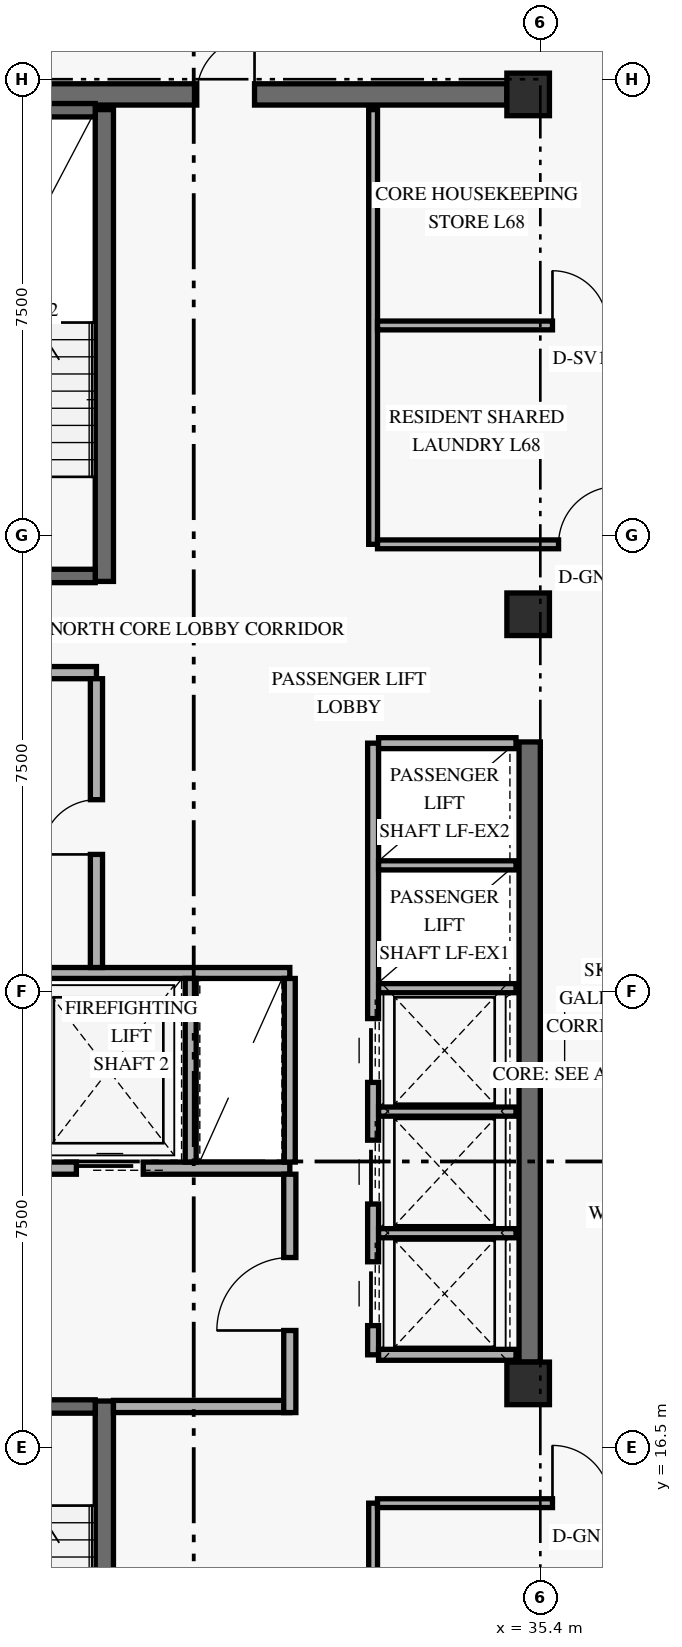
"""IFC4 building model, lengths in metres.
Left out: names, types, materials, properties, quantities, classifications, styles, units other than length and angle.
Written with IfcOpenShell. Run it as: python <this file> out.ifc"""

import sys

from ifc_helpers import new_model, si_unit, direction, frame, frame_2d, origin, origin_2d, place, context, subcontext, project, spatial, rectangle, extrude, element, fill, save


model = new_model("IFC4")
c1 = context("Model", 3, precision=1e-05, world=origin(), true_north=direction((0.0, 1.0)))
c2 = subcontext(c1, "Body", "Model", "MODEL_VIEW")
j1 = project(units=[si_unit("LENGTHUNIT", "METRE"), si_unit("PLANEANGLEUNIT", "RADIAN")], contexts=[c1])
p1 = place(None, origin())
s1 = spatial("IfcSite", under=j1, at=p1, CompositionType="ELEMENT")
p2 = place(p1, origin())
s2 = spatial("IfcBuilding", under=s1, at=p2, CompositionType="ELEMENT")
p3 = place(p2, frame((0.0, 0.0, 260.4)))
s3 = spatial("IfcBuildingStorey", under=s2, at=p3, CompositionType="ELEMENT", Elevation=260.4)
p4 = place(p3, frame((35.225, 17.9, 0.0), z_axis=(0.0, 0.0, 1.0), x_axis=(0.0, 1.0, 0.0)))
e1 = element("IfcWall", 1, at=p4, inside=s3, PredefinedType="SHEAR", context=c2, shape_type="SweptSolid", body=[
    extrude(rectangle(XDim=10.2, YDim=0.35, at=frame_2d((5.1, 0.0))), origin(), (0.0, 0.0, 1.0), 2.821),
])
p5 = place(p3, frame((24.55, 38.75, 0.0), z_axis=(0.0, 0.0, 1.0), x_axis=(1.0, 0.0, 0.0)))
e2 = element("IfcWall", 2, at=p5, inside=s3, PredefinedType="SHEAR", context=c2, shape_type="SweptSolid", body=[
    extrude(rectangle(XDim=10.3, YDim=0.35, at=frame_2d((5.15, 0.0))), origin(), (0.0, 0.0, 1.0), 3.36),
])
p6 = place(p5, frame((5.2, 0.0, 0.0)))
e3 = element("IfcOpeningElement", 3, at=p6, cuts=e2, PredefinedType="OPENING", context=c2, shape_type="SweptSolid", body=[
    extrude(rectangle(XDim=0.95, YDim=2.15, at=frame_2d((0.475, 1.075))), frame((0.0, 0.185, 0.0), z_axis=(0.0, -1.0, 0.0), x_axis=(1.0, 0.0, 0.0)), (0.0, 0.0, 1.0), 0.37),
])
p7 = place(p3, frame((28.23, 9.5, 0.0), z_axis=(0.0, 0.0, 1.0), x_axis=(0.0, 1.0, 0.0)))
e4 = element("IfcWall", 4, at=p7, inside=s3, PredefinedType="SHEAR", context=c2, shape_type="SweptSolid", body=[
    extrude(rectangle(XDim=7.76, YDim=0.3, at=frame_2d((3.88, 0.0))), origin(), (0.0, 0.0, 1.0), 3.36),
])
p8 = place(p3, frame((24.92, 17.17, 0.0), z_axis=(0.0, 0.0, 1.0), x_axis=(1.0, 0.0, 0.0)))
e5 = element("IfcWall", 5, at=p8, inside=s3, PredefinedType="SHEAR", context=c2, shape_type="SweptSolid", body=[
    extrude(rectangle(XDim=3.16, YDim=0.22, at=frame_2d((1.58, 0.0))), origin(), (0.0, 0.0, 1.0), 3.36),
])
p9 = place(p8, frame((0.78, 0.0, 0.0)))
e6 = element("IfcOpeningElement", 6, at=p9, cuts=e5, PredefinedType="OPENING", context=c2, shape_type="SweptSolid", body=[
    extrude(rectangle(XDim=1.05, YDim=2.15, at=frame_2d((0.525, 1.075))), frame((0.0, 0.12, 0.0), z_axis=(0.0, -1.0, 0.0), x_axis=(1.0, 0.0, 0.0)), (0.0, 0.0, 1.0), 0.24),
])
p10 = place(p3, frame((28.23, 30.74, 0.0), z_axis=(0.0, 0.0, 1.0), x_axis=(0.0, 1.0, 0.0)))
e7 = element("IfcWall", 7, at=p10, inside=s3, PredefinedType="SHEAR", context=c2, shape_type="SweptSolid", body=[
    extrude(rectangle(XDim=7.76, YDim=0.3, at=frame_2d((3.88, 0.0))), origin(), (0.0, 0.0, 1.0), 3.36),
])
p11 = place(p3, frame((24.92, 30.83, 0.0), z_axis=(0.0, 0.0, 1.0), x_axis=(1.0, 0.0, 0.0)))
e8 = element("IfcWall", 8, at=p11, inside=s3, PredefinedType="SHEAR", context=c2, shape_type="SweptSolid", body=[
    extrude(rectangle(XDim=3.16, YDim=0.22, at=frame_2d((1.58, 0.0))), origin(), (0.0, 0.0, 1.0), 3.36),
])
p12 = place(p11, frame((0.78, 0.0, 0.0)))
e9 = element("IfcOpeningElement", 9, at=p12, cuts=e8, PredefinedType="OPENING", context=c2, shape_type="SweptSolid", body=[
    extrude(rectangle(XDim=1.05, YDim=2.15, at=frame_2d((0.525, 1.075))), frame((0.0, 0.12, 0.0), z_axis=(0.0, -1.0, 0.0), x_axis=(1.0, 0.0, 0.0)), (0.0, 0.0, 1.0), 0.24),
])
p13 = place(p3, frame((24.92, 38.49, 0.0), z_axis=(0.0, 0.0, 1.0), x_axis=(1.0, 0.0, 0.0)))
e10 = element("IfcWall", 10, at=p13, inside=s3, PredefinedType="SHEAR", context=c2, shape_type="SweptSolid", body=[
    extrude(rectangle(XDim=3.16, YDim=0.22, at=frame_2d((1.58, 0.0))), origin(), (0.0, 0.0, 1.0), 3.36),
])
for number, where, z_axis, x_axis in (
    (11, (35.2, 17.55, 0.0), (0.0, 0.0, 1.0), (1.0, 0.0, 0.0)),
    (12, (35.2, 30.2, 0.0), (0.0, 0.0, 1.0), (1.0, 0.0, 0.0)),
    (13, (35.2, 38.75, 0.0), (0.0, 0.0, 1.0), (1.0, 0.0, 0.0)),
):
    element("IfcColumn", number, at=place(p3, frame(where, z_axis=z_axis, x_axis=x_axis)), inside=s3, PredefinedType="COLUMN", context=c2, shape_type="SweptSolid", body=[
        extrude(rectangle(XDim=0.7, YDim=0.7, at=origin_2d()), origin(), (0.0, 0.0, 1.0), 3.6),
    ])
p14 = place(p3, frame((24.45, 21.09, 0.0), z_axis=(0.0, 0.0, 1.0), x_axis=(1.0, 0.0, 0.0)))
e14 = element("IfcWall", 14, at=p14, inside=s3, PredefinedType="STANDARD", context=c2, shape_type="SweptSolid", body=[
    extrude(rectangle(XDim=6.83, YDim=0.2, at=frame_2d((3.415, 0.0))), origin(), (0.0, 0.0, 1.0), 3.36),
])
p15 = place(p14, frame((0.72, 0.0, 0.0)))
e15 = element("IfcOpeningElement", 15, at=p15, cuts=e14, PredefinedType="OPENING", context=c2, shape_type="SweptSolid", body=[
    extrude(rectangle(XDim=1.1, YDim=2.2, at=frame_2d((0.55, 1.1))), frame((0.0, 0.11, 0.0), z_axis=(0.0, -1.0, 0.0), x_axis=(1.0, 0.0, 0.0)), (0.0, 0.0, 1.0), 0.22),
])
p16 = place(p14, frame((3.32, 0.0, 0.0)))
e16 = element("IfcOpeningElement", 16, at=p16, cuts=e14, PredefinedType="OPENING", context=c2, shape_type="SweptSolid", body=[
    extrude(rectangle(XDim=1.1, YDim=2.2, at=frame_2d((0.55, 1.1))), frame((0.0, 0.11, 0.0), z_axis=(0.0, -1.0, 0.0), x_axis=(1.0, 0.0, 0.0)), (0.0, 0.0, 1.0), 0.22),
])
p17 = place(p3, frame((28.38, 17.17, 0.0), z_axis=(0.0, 0.0, 1.0), x_axis=(1.0, 0.0, 0.0)))
e17 = element("IfcWall", 17, at=p17, inside=s3, PredefinedType="STANDARD", context=c2, shape_type="SweptSolid", body=[
    extrude(rectangle(XDim=2.9, YDim=0.2, at=frame_2d((1.45, 0.0))), origin(), (0.0, 0.0, 1.0), 3.36),
])
p18 = place(p3, frame((31.28, 17.07, 0.0), z_axis=(0.0, 0.0, 1.0), x_axis=(0.0, 1.0, 0.0)))
e18 = element("IfcWall", 18, at=p18, inside=s3, PredefinedType="STANDARD", context=c2, shape_type="SweptSolid", body=[
    extrude(rectangle(XDim=3.92, YDim=0.2, at=frame_2d((1.96, 0.0))), origin(), (0.0, 0.0, 1.0), 2.803),
])
p19 = place(p18, frame((1.35, 0.0, 0.0)))
e19 = element("IfcOpeningElement", 19, at=p19, cuts=e18, PredefinedType="OPENING", context=c2, shape_type="SweptSolid", body=[
    extrude(rectangle(XDim=1.2, YDim=2.15, at=frame_2d((0.6, 1.075))), frame((0.0, 0.11, 0.0), z_axis=(0.0, -1.0, 0.0), x_axis=(1.0, 0.0, 0.0)), (0.0, 0.0, 1.0), 0.22),
])
p20 = place(p3, frame((24.45, 24.3, 0.0), z_axis=(0.0, 0.0, 1.0), x_axis=(1.0, 0.0, 0.0)))
e20 = element("IfcWall", 20, at=p20, inside=s3, PredefinedType="STANDARD", context=c2, shape_type="SweptSolid", body=[
    extrude(rectangle(XDim=6.83, YDim=0.18, at=frame_2d((3.415, 0.0))), origin(), (0.0, 0.0, 1.0), 3.36),
])
for number, where, z_axis, x_axis in (
    (21, (29.65, 21.19, 0.0), (0.0, 0.0, 1.0), (0.0, 1.0, 0.0)),
    (22, (31.28, 21.19, 0.0), (0.0, 0.0, 1.0), (0.0, 1.0, 0.0)),
):
    element("IfcWall", number, at=place(p3, frame(where, z_axis=z_axis, x_axis=x_axis)), inside=s3, PredefinedType="STANDARD", context=c2, shape_type="SweptSolid", body=[
        extrude(rectangle(XDim=3.02, YDim=0.18, at=frame_2d((1.51, 0.0))), origin(), (0.0, 0.0, 1.0), 3.36),
    ])
p21 = place(p3, frame((24.45, 29.24, 0.0), z_axis=(0.0, 0.0, 1.0), x_axis=(1.0, 0.0, 0.0)))
e23 = element("IfcWall", 23, at=p21, inside=s3, PredefinedType="STANDARD", context=c2, shape_type="SweptSolid", body=[
    extrude(rectangle(XDim=3.65, YDim=0.2, at=frame_2d((1.825, 0.0))), origin(), (0.0, 0.0, 1.0), 3.36),
])
p22 = place(p3, frame((28.1, 24.39, 0.0), z_axis=(0.0, 0.0, 1.0), x_axis=(0.0, 1.0, 0.0)))
e24 = element("IfcWall", 24, at=p22, inside=s3, PredefinedType="STANDARD", context=c2, shape_type="SweptSolid", body=[
    extrude(rectangle(XDim=4.75, YDim=0.2, at=frame_2d((2.375, 0.0))), origin(), (0.0, 0.0, 1.0), 3.36),
])
p23 = place(p22, frame((1.86, 0.0, 0.0)))
e25 = element("IfcOpeningElement", 25, at=p23, cuts=e24, PredefinedType="OPENING", context=c2, shape_type="SweptSolid", body=[
    extrude(rectangle(XDim=0.9, YDim=2.1, at=frame_2d((0.45, 1.05))), frame((0.0, 0.11, 0.0), z_axis=(0.0, -1.0, 0.0), x_axis=(1.0, 0.0, 0.0)), (0.0, 0.0, 1.0), 0.22),
])
p24 = place(p3, frame((32.65, 18.02, 0.0), z_axis=(0.0, 0.0, 1.0), x_axis=(0.0, 1.0, 0.0)))
e26 = element("IfcWall", 26, at=p24, inside=s3, PredefinedType="STANDARD", context=c2, shape_type="SweptSolid", body=[
    extrude(rectangle(XDim=10.06, YDim=0.18, at=frame_2d((5.03, 0.0))), origin(), (0.0, 0.0, 1.0), 3.36),
])
p25 = place(p24, frame((0.48, 0.0, 0.0)))
e27 = element("IfcOpeningElement", 27, at=p25, cuts=e26, PredefinedType="OPENING", context=c2, shape_type="SweptSolid", body=[
    extrude(rectangle(XDim=1.05, YDim=2.2, at=frame_2d((0.525, 1.1))), frame((0.0, 0.1, 0.0), z_axis=(0.0, -1.0, 0.0), x_axis=(1.0, 0.0, 0.0)), (0.0, 0.0, 1.0), 0.2),
])
p26 = place(p24, frame((2.48, 0.0, 0.0)))
e28 = element("IfcOpeningElement", 28, at=p26, cuts=e26, PredefinedType="OPENING", context=c2, shape_type="SweptSolid", body=[
    extrude(rectangle(XDim=1.05, YDim=2.2, at=frame_2d((0.525, 1.1))), frame((0.0, 0.1, 0.0), z_axis=(0.0, -1.0, 0.0), x_axis=(1.0, 0.0, 0.0)), (0.0, 0.0, 1.0), 0.2),
])
p27 = place(p24, frame((4.48, 0.0, 0.0)))
e29 = element("IfcOpeningElement", 29, at=p27, cuts=e26, PredefinedType="OPENING", context=c2, shape_type="SweptSolid", body=[
    extrude(rectangle(XDim=1.05, YDim=2.2, at=frame_2d((0.525, 1.1))), frame((0.0, 0.1, 0.0), z_axis=(0.0, -1.0, 0.0), x_axis=(1.0, 0.0, 0.0)), (0.0, 0.0, 1.0), 0.2),
])
for number, where, z_axis, x_axis in (
    (30, (32.74, 18.02, 0.0), (0.0, 0.0, 1.0), (1.0, 0.0, 0.0)),
    (31, (32.74, 28.08, 0.0), (0.0, 0.0, 1.0), (1.0, 0.0, 0.0)),
):
    element("IfcWall", number, at=place(p3, frame(where, z_axis=z_axis, x_axis=x_axis)), inside=s3, PredefinedType="STANDARD", context=c2, shape_type="SweptSolid", body=[
        extrude(rectangle(XDim=2.26, YDim=0.18, at=frame_2d((1.13, 0.0))), origin(), (0.0, 0.0, 1.0), 3.36),
    ])
for number, where, z_axis, x_axis in (
    (32, (32.74, 20.02, 0.0), (0.0, 0.0, 1.0), (1.0, 0.0, 0.0)),
    (33, (32.74, 22.02, 0.0), (0.0, 0.0, 1.0), (1.0, 0.0, 0.0)),
    (34, (32.74, 24.05, 0.0), (0.0, 0.0, 1.0), (1.0, 0.0, 0.0)),
    (35, (32.74, 26.07, 0.0), (0.0, 0.0, 1.0), (1.0, 0.0, 0.0)),
):
    element("IfcWall", number, at=place(p3, frame(where, z_axis=z_axis, x_axis=x_axis)), inside=s3, PredefinedType="STANDARD", context=c2, shape_type="SweptSolid", body=[
        extrude(rectangle(XDim=2.26, YDim=0.15, at=frame_2d((1.13, 0.0))), origin(), (0.0, 0.0, 1.0), 3.36),
    ])
p28 = place(p3, frame((32.65, 9.5, 0.0), z_axis=(0.0, 0.0, 1.0), x_axis=(0.0, 1.0, 0.0)))
e36 = element("IfcWall", 36, at=p28, inside=s3, PredefinedType="PARTITIONING", context=c2, shape_type="SweptSolid", body=[
    extrude(rectangle(XDim=6.08, YDim=0.145, at=frame_2d((3.04, 0.0))), origin(), (0.0, 0.0, 1.0), 3.36),
])
p29 = place(p3, frame((32.722, 15.58, 0.0), z_axis=(0.0, 0.0, 1.0), x_axis=(1.0, 0.0, 0.0)))
e37 = element("IfcWall", 37, at=p29, inside=s3, PredefinedType="PARTITIONING", context=c2, shape_type="SweptSolid", body=[
    extrude(rectangle(XDim=4.828, YDim=0.145, at=frame_2d((2.414, 0.0))), origin(), (0.0, 0.0, 1.0), 2.803),
])
p30 = place(p29, frame((2.877, 0.0, 0.0)))
e38 = element("IfcOpeningElement", 38, at=p30, cuts=e37, PredefinedType="OPENING", context=c2, shape_type="SweptSolid", body=[
    extrude(rectangle(XDim=0.95, YDim=2.15, at=frame_2d((0.475, 1.075))), frame((0.0, 0.083, 0.0), z_axis=(0.0, -1.0, 0.0), x_axis=(1.0, 0.0, 0.0)), (0.0, 0.0, 1.0), 0.165),
])
p31 = place(p3, frame((32.65, 31.35, 0.0), z_axis=(0.0, 0.0, 1.0), x_axis=(0.0, 1.0, 0.0)))
e39 = element("IfcWall", 39, at=p31, inside=s3, PredefinedType="PARTITIONING", context=c2, shape_type="SweptSolid", body=[
    extrude(rectangle(XDim=7.15, YDim=0.145, at=frame_2d((3.575, 0.0))), origin(), (0.0, 0.0, 1.0), 3.36),
])
p32 = place(p3, frame((32.722, 31.35, 0.0), z_axis=(0.0, 0.0, 1.0), x_axis=(1.0, 0.0, 0.0)))
e40 = element("IfcWall", 40, at=p32, inside=s3, PredefinedType="PARTITIONING", context=c2, shape_type="SweptSolid", body=[
    extrude(rectangle(XDim=5.378, YDim=0.145, at=frame_2d((2.689, 0.0))), origin(), (0.0, 0.0, 1.0), 2.803),
])
p33 = place(p32, frame((2.978, 0.0, 0.0)))
e41 = element("IfcOpeningElement", 41, at=p33, cuts=e40, PredefinedType="OPENING", context=c2, shape_type="SweptSolid", body=[
    extrude(rectangle(XDim=0.95, YDim=2.15, at=frame_2d((0.475, 1.075))), frame((0.0, 0.083, 0.0), z_axis=(0.0, -1.0, 0.0), x_axis=(1.0, 0.0, 0.0)), (0.0, 0.0, 1.0), 0.165),
])
p34 = place(p3, frame((32.722, 34.95, 0.0), z_axis=(0.0, 0.0, 1.0), x_axis=(1.0, 0.0, 0.0)))
e42 = element("IfcWall", 42, at=p34, inside=s3, PredefinedType="PARTITIONING", context=c2, shape_type="SweptSolid", body=[
    extrude(rectangle(XDim=5.305, YDim=0.145, at=frame_2d((2.653, 0.0))), origin(), (0.0, 0.0, 1.0), 2.803),
])
p35 = place(p34, frame((2.877, 0.0, 0.0)))
e43 = element("IfcOpeningElement", 43, at=p35, cuts=e42, PredefinedType="OPENING", context=c2, shape_type="SweptSolid", body=[
    extrude(rectangle(XDim=0.9, YDim=2.1, at=frame_2d((0.45, 1.05))), frame((0.0, 0.083, 0.0), z_axis=(0.0, -1.0, 0.0), x_axis=(1.0, 0.0, 0.0)), (0.0, 0.0, 1.0), 0.165),
])
p36 = place(p16, origin())
e44 = element("IfcDoor", 44, at=p36, inside=s3, OperationType="SLIDING_TO_LEFT", PredefinedType="DOOR", context=c2, shape_type="SweptSolid", body=[
    extrude(rectangle(XDim=1.1, YDim=2.2, at=frame_2d((0.55, 1.1))), frame((0.0, 0.025, 0.0), z_axis=(0.0, -1.0, 0.0), x_axis=(1.0, 0.0, 0.0)), (0.0, 0.0, 1.0), 0.05),
])
fill(e16, e44)
p37 = place(p19, origin())
e45 = element("IfcDoor", 45, at=p37, inside=s3, OperationType="SINGLE_SWING_LEFT", PredefinedType="DOOR", context=c2, shape_type="SweptSolid", body=[
    extrude(rectangle(XDim=1.2, YDim=2.15, at=frame_2d((0.6, 1.075))), frame((0.0, 0.025, 0.0), z_axis=(0.0, -1.0, 0.0), x_axis=(1.0, 0.0, 0.0)), (0.0, 0.0, 1.0), 0.05),
])
fill(e19, e45)
p38 = place(p23, origin())
e46 = element("IfcDoor", 46, at=p38, inside=s3, OperationType="SINGLE_SWING_LEFT", PredefinedType="DOOR", context=c2, shape_type="SweptSolid", body=[
    extrude(rectangle(XDim=0.9, YDim=2.1, at=frame_2d((0.45, 1.05))), frame((0.0, 0.025, 0.0), z_axis=(0.0, -1.0, 0.0), x_axis=(1.0, 0.0, 0.0)), (0.0, 0.0, 1.0), 0.05),
])
fill(e25, e46)
p39 = place(p25, origin())
e47 = element("IfcDoor", 47, at=p39, inside=s3, OperationType="SLIDING_TO_LEFT", PredefinedType="DOOR", context=c2, shape_type="SweptSolid", body=[
    extrude(rectangle(XDim=1.05, YDim=2.2, at=frame_2d((0.525, 1.1))), frame((0.0, 0.025, 0.0), z_axis=(0.0, -1.0, 0.0), x_axis=(1.0, 0.0, 0.0)), (0.0, 0.0, 1.0), 0.05),
])
fill(e27, e47)
p40 = place(p26, origin())
e48 = element("IfcDoor", 48, at=p40, inside=s3, OperationType="SLIDING_TO_LEFT", PredefinedType="DOOR", context=c2, shape_type="SweptSolid", body=[
    extrude(rectangle(XDim=1.05, YDim=2.2, at=frame_2d((0.525, 1.1))), frame((0.0, 0.025, 0.0), z_axis=(0.0, -1.0, 0.0), x_axis=(1.0, 0.0, 0.0)), (0.0, 0.0, 1.0), 0.05),
])
fill(e28, e48)
p41 = place(p27, origin())
e49 = element("IfcDoor", 49, at=p41, inside=s3, OperationType="SLIDING_TO_LEFT", PredefinedType="DOOR", context=c2, shape_type="SweptSolid", body=[
    extrude(rectangle(XDim=1.05, YDim=2.2, at=frame_2d((0.525, 1.1))), frame((0.0, 0.025, 0.0), z_axis=(0.0, -1.0, 0.0), x_axis=(1.0, 0.0, 0.0)), (0.0, 0.0, 1.0), 0.05),
])
fill(e29, e49)
p42 = place(p30, origin())
e50 = element("IfcDoor", 50, at=p42, inside=s3, OperationType="SINGLE_SWING_LEFT", PredefinedType="DOOR", context=c2, shape_type="SweptSolid", body=[
    extrude(rectangle(XDim=0.95, YDim=2.15, at=frame_2d((0.475, 1.075))), frame((0.0, 0.025, 0.0), z_axis=(0.0, -1.0, 0.0), x_axis=(1.0, 0.0, 0.0)), (0.0, 0.0, 1.0), 0.05),
])
fill(e38, e50)
p43 = place(p33, origin())
e51 = element("IfcDoor", 51, at=p43, inside=s3, OperationType="SINGLE_SWING_RIGHT", PredefinedType="DOOR", context=c2, shape_type="SweptSolid", body=[
    extrude(rectangle(XDim=0.95, YDim=2.15, at=frame_2d((0.475, 1.075))), frame((0.0, 0.025, 0.0), z_axis=(0.0, -1.0, 0.0), x_axis=(1.0, 0.0, 0.0)), (0.0, 0.0, 1.0), 0.05),
])
fill(e41, e51)
p44 = place(p35, origin())
e52 = element("IfcDoor", 52, at=p44, inside=s3, OperationType="SINGLE_SWING_LEFT", PredefinedType="DOOR", context=c2, shape_type="SweptSolid", body=[
    extrude(rectangle(XDim=0.9, YDim=2.1, at=frame_2d((0.45, 1.05))), frame((0.0, 0.025, 0.0), z_axis=(0.0, -1.0, 0.0), x_axis=(1.0, 0.0, 0.0)), (0.0, 0.0, 1.0), 0.05),
])
fill(e43, e52)
p45 = place(p6, origin())
e53 = element("IfcDoor", 53, at=p45, inside=s3, OperationType="SINGLE_SWING_RIGHT", PredefinedType="DOOR", context=c2, shape_type="SweptSolid", body=[
    extrude(rectangle(XDim=0.95, YDim=2.15, at=frame_2d((0.475, 1.075))), frame((0.0, 0.025, 0.0), z_axis=(0.0, -1.0, 0.0), x_axis=(1.0, 0.0, 0.0)), (0.0, 0.0, 1.0), 0.05),
])
fill(e3, e53)
save(model, sys.argv[1])
